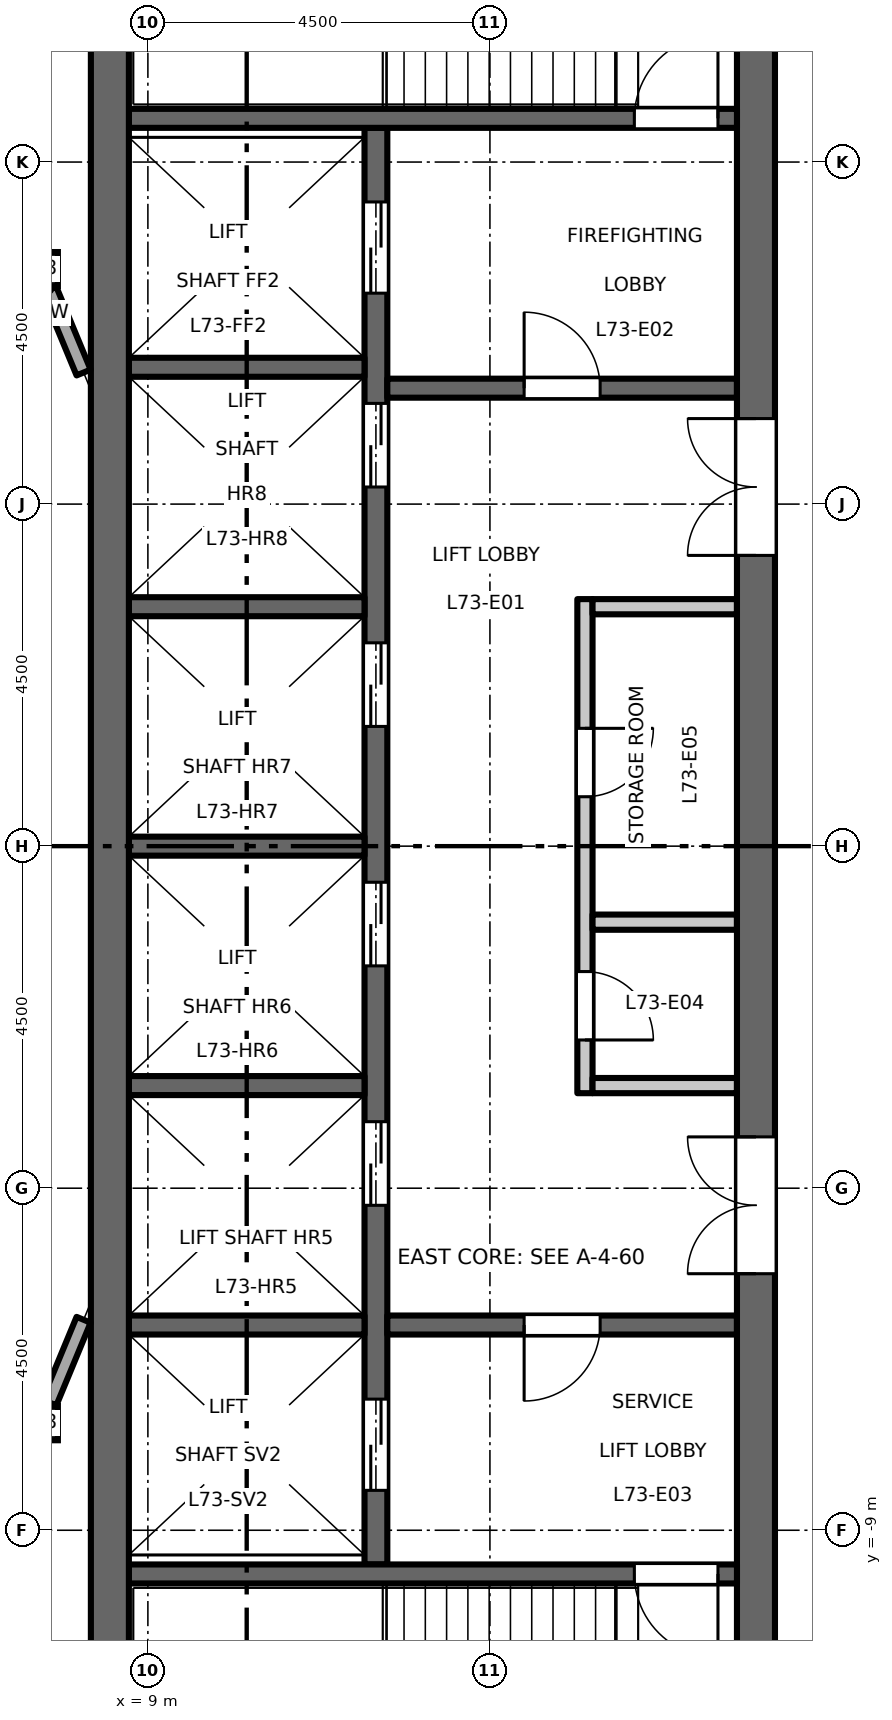
"""IFC4 building model, lengths in metres.
Left out: names, types, materials, properties, quantities, classifications, styles, units other than length and angle.
Written with IfcOpenShell. Run it as: python <this file> out.ifc"""

import sys

from ifc_helpers import new_model, si_unit, direction, frame, frame_2d, origin, origin_2d, place, context, subcontext, project, spatial, rectangle, hollow_rectangle, extrude, element, fill, save


model = new_model("IFC4")
c1 = context("Model", 3, precision=1e-05, world=origin(), true_north=direction((0.0, 1.0)))
c2 = subcontext(c1, "Body", "Model", "MODEL_VIEW")
j1 = project(units=[si_unit("LENGTHUNIT", "METRE"), si_unit("PLANEANGLEUNIT", "RADIAN")], contexts=[c1])
p1 = place(None, origin())
s1 = spatial("IfcSite", under=j1, at=p1, CompositionType="ELEMENT")
p2 = place(p1, origin())
s2 = spatial("IfcBuilding", under=s1, at=p2, CompositionType="ELEMENT")
p3 = place(p2, frame((0.0, 0.0, 339.2)))
s3 = spatial("IfcBuildingStorey", under=s2, at=p3, CompositionType="ELEMENT", Elevation=339.2)
for number, where, z_axis, x_axis in (
    (1, (7.591, -7.591, 0.0), (0.0, 0.0, 1.0), (1.0, 0.0, 0.0)),
    (2, (7.591, 7.591, 0.0), (0.0, 0.0, 1.0), (1.0, 0.0, 0.0)),
):
    element("IfcColumn", number, at=place(p3, frame(where, z_axis=z_axis, x_axis=x_axis)), inside=s3, PredefinedType="COLUMN", context=c2, shape_type="SweptSolid", body=[
        extrude(hollow_rectangle(XDim=0.45, YDim=0.45, WallThickness=0.022, at=origin_2d()), origin(), (0.0, 0.0, 1.0), 4.5),
    ])
p4 = place(p3, frame((14.75, -3.25, 0.0), z_axis=(0.0, 0.0, 1.0), x_axis=(0.0, 1.0, 0.0)))
e3 = element("IfcWall", 3, at=p4, inside=s3, PredefinedType="PARTITIONING", context=c2, shape_type="SweptSolid", body=[
    extrude(rectangle(XDim=6.5, YDim=0.2, at=frame_2d((3.25, 0.0))), origin(), (0.0, 0.0, 1.0), 4.35),
])
p5 = place(p4, frame((0.7, 0.0, 0.0)))
e4 = element("IfcOpeningElement", 4, at=p5, cuts=e3, PredefinedType="OPENING", context=c2, shape_type="SweptSolid", body=[
    extrude(rectangle(XDim=0.9, YDim=2.1, at=frame_2d((0.45, 1.05))), frame((0.0, 0.11, 0.0), z_axis=(0.0, -1.0, 0.0), x_axis=(1.0, 0.0, 0.0)), (0.0, 0.0, 1.0), 0.22),
])
p6 = place(p4, frame((3.9, 0.0, 0.0)))
e5 = element("IfcOpeningElement", 5, at=p6, cuts=e3, PredefinedType="OPENING", context=c2, shape_type="SweptSolid", body=[
    extrude(rectangle(XDim=0.9, YDim=2.1, at=frame_2d((0.45, 1.05))), frame((0.0, 0.11, 0.0), z_axis=(0.0, -1.0, 0.0), x_axis=(1.0, 0.0, 0.0)), (0.0, 0.0, 1.0), 0.22),
])
for number, where, z_axis, x_axis in (
    (6, (14.85, 3.15, 0.0), (0.0, 0.0, 1.0), (1.0, 0.0, 0.0)),
    (7, (14.85, -3.15, 0.0), (0.0, 0.0, 1.0), (1.0, 0.0, 0.0)),
    (8, (14.85, -1.0, 0.0), (0.0, 0.0, 1.0), (1.0, 0.0, 0.0)),
):
    element("IfcWall", number, at=place(p3, frame(where, z_axis=z_axis, x_axis=x_axis)), inside=s3, PredefinedType="PARTITIONING", context=c2, shape_type="SweptSolid", body=[
        extrude(rectangle(XDim=1.9, YDim=0.2, at=frame_2d((0.95, 0.0))), origin(), (0.0, 0.0, 1.0), 4.35),
    ])
p7 = place(p3, frame((12.0, -9.45, 0.0), z_axis=(0.0, 0.0, 1.0), x_axis=(0.0, 1.0, 0.0)))
e9 = element("IfcWall", 9, at=p7, inside=s3, PredefinedType="SHEAR", context=c2, shape_type="SweptSolid", body=[
    extrude(rectangle(XDim=18.9, YDim=0.3, at=frame_2d((9.45, 0.0))), origin(), (0.0, 0.0, 1.0), 4.35),
])
p8 = place(p7, frame((4.725, 0.0, 0.0)))
e10 = element("IfcOpeningElement", 10, at=p8, cuts=e9, PredefinedType="OPENING", context=c2, shape_type="SweptSolid", body=[
    extrude(rectangle(XDim=1.1, YDim=2.1, at=frame_2d((0.55, 1.05))), frame((0.0, 0.16, 0.0), z_axis=(0.0, -1.0, 0.0), x_axis=(1.0, 0.0, 0.0)), (0.0, 0.0, 1.0), 0.32),
])
p9 = place(p7, frame((7.875, 0.0, 0.0)))
e11 = element("IfcOpeningElement", 11, at=p9, cuts=e9, PredefinedType="OPENING", context=c2, shape_type="SweptSolid", body=[
    extrude(rectangle(XDim=1.1, YDim=2.1, at=frame_2d((0.55, 1.05))), frame((0.0, 0.16, 0.0), z_axis=(0.0, -1.0, 0.0), x_axis=(1.0, 0.0, 0.0)), (0.0, 0.0, 1.0), 0.32),
])
p10 = place(p7, frame((11.025, 0.0, 0.0)))
e12 = element("IfcOpeningElement", 12, at=p10, cuts=e9, PredefinedType="OPENING", context=c2, shape_type="SweptSolid", body=[
    extrude(rectangle(XDim=1.1, YDim=2.1, at=frame_2d((0.55, 1.05))), frame((0.0, 0.16, 0.0), z_axis=(0.0, -1.0, 0.0), x_axis=(1.0, 0.0, 0.0)), (0.0, 0.0, 1.0), 0.32),
])
p11 = place(p7, frame((14.175, 0.0, 0.0)))
e13 = element("IfcOpeningElement", 13, at=p11, cuts=e9, PredefinedType="OPENING", context=c2, shape_type="SweptSolid", body=[
    extrude(rectangle(XDim=1.1, YDim=2.1, at=frame_2d((0.55, 1.05))), frame((0.0, 0.16, 0.0), z_axis=(0.0, -1.0, 0.0), x_axis=(1.0, 0.0, 0.0)), (0.0, 0.0, 1.0), 0.32),
])
p12 = place(p7, frame((16.725, 0.0, 0.0)))
e14 = element("IfcOpeningElement", 14, at=p12, cuts=e9, PredefinedType="OPENING", context=c2, shape_type="SweptSolid", body=[
    extrude(rectangle(XDim=1.2, YDim=2.1, at=frame_2d((0.6, 1.05))), frame((0.0, 0.16, 0.0), z_axis=(0.0, -1.0, 0.0), x_axis=(1.0, 0.0, 0.0)), (0.0, 0.0, 1.0), 0.32),
])
p13 = place(p7, frame((0.975, 0.0, 0.0)))
e15 = element("IfcOpeningElement", 15, at=p13, cuts=e9, PredefinedType="OPENING", context=c2, shape_type="SweptSolid", body=[
    extrude(rectangle(XDim=1.2, YDim=2.1, at=frame_2d((0.6, 1.05))), frame((0.0, 0.16, 0.0), z_axis=(0.0, -1.0, 0.0), x_axis=(1.0, 0.0, 0.0)), (0.0, 0.0, 1.0), 0.32),
])
p14 = place(p3, frame((12.15, 6.025, 0.0), z_axis=(0.0, 0.0, 1.0), x_axis=(1.0, 0.0, 0.0)))
e16 = element("IfcWall", 16, at=p14, inside=s3, PredefinedType="SHEAR", context=c2, shape_type="SweptSolid", body=[
    extrude(rectangle(XDim=4.6, YDim=0.25, at=frame_2d((2.3, 0.0))), origin(), (0.0, 0.0, 1.0), 4.35),
])
p15 = place(p14, frame((1.8, 0.0, 0.0)))
e17 = element("IfcOpeningElement", 17, at=p15, cuts=e16, PredefinedType="OPENING", context=c2, shape_type="SweptSolid", body=[
    extrude(rectangle(XDim=1.0, YDim=2.1, at=frame_2d((0.5, 1.05))), frame((0.0, 0.135, 0.0), z_axis=(0.0, -1.0, 0.0), x_axis=(1.0, 0.0, 0.0)), (0.0, 0.0, 1.0), 0.27),
])
p16 = place(p3, frame((12.15, -6.3, 0.0), z_axis=(0.0, 0.0, 1.0), x_axis=(1.0, 0.0, 0.0)))
e18 = element("IfcWall", 18, at=p16, inside=s3, PredefinedType="SHEAR", context=c2, shape_type="SweptSolid", body=[
    extrude(rectangle(XDim=4.6, YDim=0.25, at=frame_2d((2.3, 0.0))), origin(), (0.0, 0.0, 1.0), 4.35),
])
p17 = place(p16, frame((1.8, 0.0, 0.0)))
e19 = element("IfcOpeningElement", 19, at=p17, cuts=e18, PredefinedType="OPENING", context=c2, shape_type="SweptSolid", body=[
    extrude(rectangle(XDim=1.0, YDim=2.1, at=frame_2d((0.5, 1.05))), frame((0.0, 0.135, 0.0), z_axis=(0.0, -1.0, 0.0), x_axis=(1.0, 0.0, 0.0)), (0.0, 0.0, 1.0), 0.27),
])
p18 = place(p3, frame((17.0, -13.0, 0.0), z_axis=(0.0, 0.0, 1.0), x_axis=(0.0, 1.0, 0.0)))
e20 = element("IfcWall", 20, at=p18, inside=s3, PredefinedType="SHEAR", context=c2, shape_type="SweptSolid", body=[
    extrude(rectangle(XDim=26.0, YDim=0.5, at=frame_2d((13.0, 0.0))), origin(), (0.0, 0.0, 1.0), 4.35),
])
p19 = place(p18, frame((16.825, 0.0, 0.0)))
e21 = element("IfcOpeningElement", 21, at=p19, cuts=e20, PredefinedType="OPENING", context=c2, shape_type="SweptSolid", body=[
    extrude(rectangle(XDim=1.8, YDim=2.1, at=frame_2d((0.9, 1.05))), frame((0.0, 0.26, 0.0), z_axis=(0.0, -1.0, 0.0), x_axis=(1.0, 0.0, 0.0)), (0.0, 0.0, 1.0), 0.52),
])
p20 = place(p18, frame((7.375, 0.0, 0.0)))
e22 = element("IfcOpeningElement", 22, at=p20, cuts=e20, PredefinedType="OPENING", context=c2, shape_type="SweptSolid", body=[
    extrude(rectangle(XDim=1.8, YDim=2.1, at=frame_2d((0.9, 1.05))), frame((0.0, 0.26, 0.0), z_axis=(0.0, -1.0, 0.0), x_axis=(1.0, 0.0, 0.0)), (0.0, 0.0, 1.0), 0.52),
])
for number, where, z_axis, x_axis in (
    (23, (8.75, 0.0, 0.0), (0.0, 0.0, 1.0), (1.0, 0.0, 0.0)),
    (24, (8.75, 3.15, 0.0), (0.0, 0.0, 1.0), (1.0, 0.0, 0.0)),
    (25, (8.75, 6.3, 0.0), (0.0, 0.0, 1.0), (1.0, 0.0, 0.0)),
    (26, (8.75, -3.15, 0.0), (0.0, 0.0, 1.0), (1.0, 0.0, 0.0)),
    (27, (8.75, -6.3, 0.0), (0.0, 0.0, 1.0), (1.0, 0.0, 0.0)),
):
    element("IfcWall", number, at=place(p3, frame(where, z_axis=z_axis, x_axis=x_axis)), inside=s3, PredefinedType="SHEAR", context=c2, shape_type="SweptSolid", body=[
        extrude(rectangle(XDim=3.1, YDim=0.25, at=frame_2d((1.55, 0.0))), origin(), (0.0, 0.0, 1.0), 4.35),
    ])
p21 = place(p3, frame((8.75, 9.575, 0.0), z_axis=(0.0, 0.0, 1.0), x_axis=(1.0, 0.0, 0.0)))
e28 = element("IfcWall", 28, at=p21, inside=s3, PredefinedType="SHEAR", context=c2, shape_type="SweptSolid", body=[
    extrude(rectangle(XDim=8.0, YDim=0.25, at=frame_2d((4.0, 0.0))), origin(), (0.0, 0.0, 1.0), 4.35),
])
p22 = place(p21, frame((6.65, 0.0, 0.0)))
e29 = element("IfcOpeningElement", 29, at=p22, cuts=e28, PredefinedType="OPENING", context=c2, shape_type="SweptSolid", body=[
    extrude(rectangle(XDim=1.1, YDim=2.1, at=frame_2d((0.55, 1.05))), frame((0.0, 0.135, 0.0), z_axis=(0.0, -1.0, 0.0), x_axis=(1.0, 0.0, 0.0)), (0.0, 0.0, 1.0), 0.27),
])
p23 = place(p3, frame((8.75, -9.575, 0.0), z_axis=(0.0, 0.0, 1.0), x_axis=(1.0, 0.0, 0.0)))
e30 = element("IfcWall", 30, at=p23, inside=s3, PredefinedType="SHEAR", context=c2, shape_type="SweptSolid", body=[
    extrude(rectangle(XDim=8.0, YDim=0.25, at=frame_2d((4.0, 0.0))), origin(), (0.0, 0.0, 1.0), 4.35),
])
p24 = place(p23, frame((6.65, 0.0, 0.0)))
e31 = element("IfcOpeningElement", 31, at=p24, cuts=e30, PredefinedType="OPENING", context=c2, shape_type="SweptSolid", body=[
    extrude(rectangle(XDim=1.1, YDim=2.1, at=frame_2d((0.55, 1.05))), frame((0.0, 0.135, 0.0), z_axis=(0.0, -1.0, 0.0), x_axis=(1.0, 0.0, 0.0)), (0.0, 0.0, 1.0), 0.27),
])
p25 = place(p3, frame((8.5, -13.0, 0.0), z_axis=(0.0, 0.0, 1.0), x_axis=(0.0, 1.0, 0.0)))
e32 = element("IfcWall", 32, at=p25, inside=s3, PredefinedType="SHEAR", context=c2, shape_type="SweptSolid", body=[
    extrude(rectangle(XDim=26.0, YDim=0.5, at=frame_2d((13.0, 0.0))), origin(), (0.0, 0.0, 1.0), 4.35),
])
for number, where, z_axis, x_axis in (
    (33, (7.703, -7.319, 0.0), (0.0, 0.0, 1.0), (0.383, 0.924, 0.0)),
    (34, (8.154, 6.231, 0.0), (0.0, 0.0, 1.0), (-0.383, 0.924, 0.0)),
):
    element("IfcWall", number, at=place(p3, frame(where, z_axis=z_axis, x_axis=x_axis)), inside=s3, PredefinedType="STANDARD", context=c2, shape_type="SweptSolid", body=[
        extrude(rectangle(XDim=1.178, YDim=0.2, at=frame_2d((0.589, 0.0))), origin(), (0.0, 0.0, 1.0), 4.01),
    ])
p26 = place(p15, origin())
e35 = element("IfcDoor", 35, at=p26, inside=s3, OperationType="SINGLE_SWING_RIGHT", PredefinedType="DOOR", context=c2, shape_type="SweptSolid", body=[
    extrude(rectangle(XDim=1.0, YDim=2.1, at=frame_2d((0.5, 1.05))), frame((0.0, 0.025, 0.0), z_axis=(0.0, -1.0, 0.0), x_axis=(1.0, 0.0, 0.0)), (0.0, 0.0, 1.0), 0.05),
])
fill(e17, e35)
p27 = place(p17, origin())
e36 = element("IfcDoor", 36, at=p27, inside=s3, OperationType="SINGLE_SWING_LEFT", PredefinedType="DOOR", context=c2, shape_type="SweptSolid", body=[
    extrude(rectangle(XDim=1.0, YDim=2.1, at=frame_2d((0.5, 1.05))), frame((0.0, 0.025, 0.0), z_axis=(0.0, -1.0, 0.0), x_axis=(1.0, 0.0, 0.0)), (0.0, 0.0, 1.0), 0.05),
])
fill(e19, e36)
p28 = place(p22, origin())
e37 = element("IfcDoor", 37, at=p28, inside=s3, OperationType="SINGLE_SWING_LEFT", PredefinedType="DOOR", context=c2, shape_type="SweptSolid", body=[
    extrude(rectangle(XDim=1.1, YDim=2.1, at=frame_2d((0.55, 1.05))), frame((0.0, 0.025, 0.0), z_axis=(0.0, -1.0, 0.0), x_axis=(1.0, 0.0, 0.0)), (0.0, 0.0, 1.0), 0.05),
])
fill(e29, e37)
p29 = place(p24, origin())
e38 = element("IfcDoor", 38, at=p29, inside=s3, OperationType="SINGLE_SWING_RIGHT", PredefinedType="DOOR", context=c2, shape_type="SweptSolid", body=[
    extrude(rectangle(XDim=1.1, YDim=2.1, at=frame_2d((0.55, 1.05))), frame((0.0, 0.025, 0.0), z_axis=(0.0, -1.0, 0.0), x_axis=(1.0, 0.0, 0.0)), (0.0, 0.0, 1.0), 0.05),
])
fill(e31, e38)
p30 = place(p19, origin())
e39 = element("IfcDoor", 39, at=p30, inside=s3, OperationType="DOUBLE_DOOR_DOUBLE_SWING", PredefinedType="DOOR", context=c2, shape_type="SweptSolid", body=[
    extrude(rectangle(XDim=1.8, YDim=2.1, at=frame_2d((0.9, 1.05))), frame((0.0, 0.025, 0.0), z_axis=(0.0, -1.0, 0.0), x_axis=(1.0, 0.0, 0.0)), (0.0, 0.0, 1.0), 0.05),
])
fill(e21, e39)
p31 = place(p20, origin())
e40 = element("IfcDoor", 40, at=p31, inside=s3, OperationType="DOUBLE_DOOR_DOUBLE_SWING", PredefinedType="DOOR", context=c2, shape_type="SweptSolid", body=[
    extrude(rectangle(XDim=1.8, YDim=2.1, at=frame_2d((0.9, 1.05))), frame((0.0, 0.025, 0.0), z_axis=(0.0, -1.0, 0.0), x_axis=(1.0, 0.0, 0.0)), (0.0, 0.0, 1.0), 0.05),
])
fill(e22, e40)
p32 = place(p8, origin())
e41 = element("IfcDoor", 41, at=p32, inside=s3, OperationType="DOUBLE_DOOR_SLIDING", PredefinedType="DOOR", context=c2, shape_type="SweptSolid", body=[
    extrude(rectangle(XDim=1.1, YDim=2.1, at=frame_2d((0.55, 1.05))), frame((0.0, 0.025, 0.0), z_axis=(0.0, -1.0, 0.0), x_axis=(1.0, 0.0, 0.0)), (0.0, 0.0, 1.0), 0.05),
])
fill(e10, e41)
p33 = place(p9, origin())
e42 = element("IfcDoor", 42, at=p33, inside=s3, OperationType="DOUBLE_DOOR_SLIDING", PredefinedType="DOOR", context=c2, shape_type="SweptSolid", body=[
    extrude(rectangle(XDim=1.1, YDim=2.1, at=frame_2d((0.55, 1.05))), frame((0.0, 0.025, 0.0), z_axis=(0.0, -1.0, 0.0), x_axis=(1.0, 0.0, 0.0)), (0.0, 0.0, 1.0), 0.05),
])
fill(e11, e42)
p34 = place(p10, origin())
e43 = element("IfcDoor", 43, at=p34, inside=s3, OperationType="DOUBLE_DOOR_SLIDING", PredefinedType="DOOR", context=c2, shape_type="SweptSolid", body=[
    extrude(rectangle(XDim=1.1, YDim=2.1, at=frame_2d((0.55, 1.05))), frame((0.0, 0.025, 0.0), z_axis=(0.0, -1.0, 0.0), x_axis=(1.0, 0.0, 0.0)), (0.0, 0.0, 1.0), 0.05),
])
fill(e12, e43)
p35 = place(p11, origin())
e44 = element("IfcDoor", 44, at=p35, inside=s3, OperationType="DOUBLE_DOOR_SLIDING", PredefinedType="DOOR", context=c2, shape_type="SweptSolid", body=[
    extrude(rectangle(XDim=1.1, YDim=2.1, at=frame_2d((0.55, 1.05))), frame((0.0, 0.025, 0.0), z_axis=(0.0, -1.0, 0.0), x_axis=(1.0, 0.0, 0.0)), (0.0, 0.0, 1.0), 0.05),
])
fill(e13, e44)
p36 = place(p12, origin())
e45 = element("IfcDoor", 45, at=p36, inside=s3, OperationType="DOUBLE_DOOR_SLIDING", PredefinedType="DOOR", context=c2, shape_type="SweptSolid", body=[
    extrude(rectangle(XDim=1.2, YDim=2.1, at=frame_2d((0.6, 1.05))), frame((0.0, 0.025, 0.0), z_axis=(0.0, -1.0, 0.0), x_axis=(1.0, 0.0, 0.0)), (0.0, 0.0, 1.0), 0.05),
])
fill(e14, e45)
p37 = place(p13, origin())
e46 = element("IfcDoor", 46, at=p37, inside=s3, OperationType="DOUBLE_DOOR_SLIDING", PredefinedType="DOOR", context=c2, shape_type="SweptSolid", body=[
    extrude(rectangle(XDim=1.2, YDim=2.1, at=frame_2d((0.6, 1.05))), frame((0.0, 0.025, 0.0), z_axis=(0.0, -1.0, 0.0), x_axis=(1.0, 0.0, 0.0)), (0.0, 0.0, 1.0), 0.05),
])
fill(e15, e46)
p38 = place(p5, origin())
e47 = element("IfcDoor", 47, at=p38, inside=s3, OperationType="SINGLE_SWING_LEFT", PredefinedType="DOOR", context=c2, shape_type="SweptSolid", body=[
    extrude(rectangle(XDim=0.9, YDim=2.1, at=frame_2d((0.45, 1.05))), frame((0.0, 0.025, 0.0), z_axis=(0.0, -1.0, 0.0), x_axis=(1.0, 0.0, 0.0)), (0.0, 0.0, 1.0), 0.05),
])
fill(e4, e47)
p39 = place(p6, origin())
e48 = element("IfcDoor", 48, at=p39, inside=s3, OperationType="SINGLE_SWING_RIGHT", PredefinedType="DOOR", context=c2, shape_type="SweptSolid", body=[
    extrude(rectangle(XDim=0.9, YDim=2.1, at=frame_2d((0.45, 1.05))), frame((0.0, 0.025, 0.0), z_axis=(0.0, -1.0, 0.0), x_axis=(1.0, 0.0, 0.0)), (0.0, 0.0, 1.0), 0.05),
])
fill(e5, e48)
save(model, sys.argv[1])
